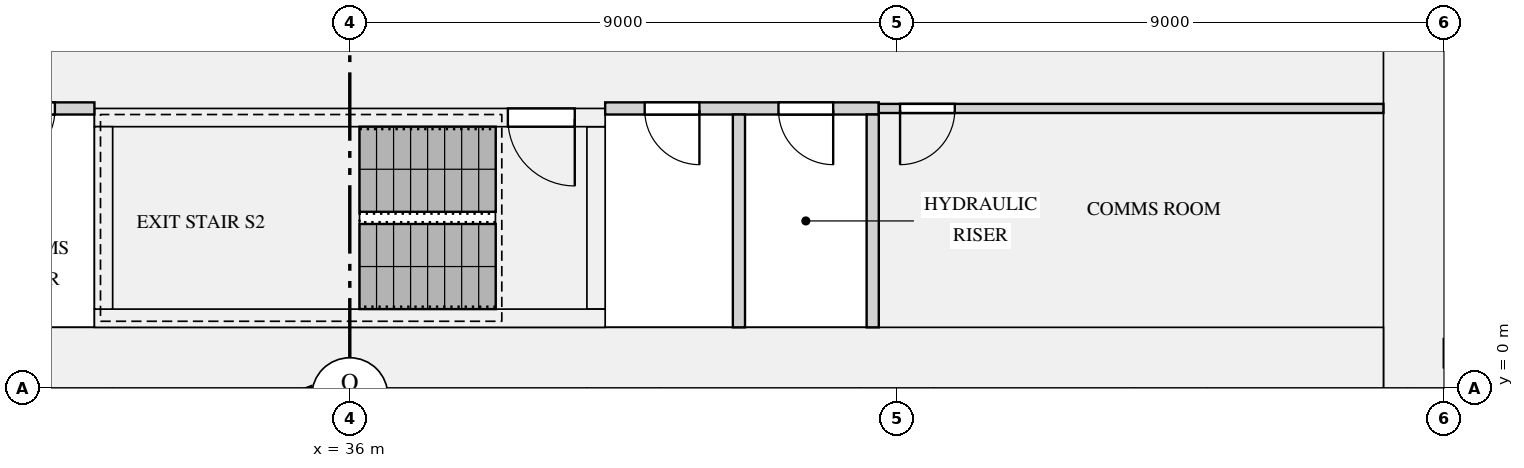
"""IFC4 building model, lengths in metres.
Left out: names, types, materials, properties, quantities, classifications, styles, units other than length and angle.
Written with IfcOpenShell. Run it as: python <this file> out.ifc"""

import sys

from ifc_helpers import new_model, si_unit, direction, frame, frame_2d, origin, place, context, subcontext, project, spatial, rectangle, extrude, element, fill, save


model = new_model("IFC4")
c1 = context("Model", 3, precision=1e-05, world=origin(), true_north=direction((0.0, 1.0)))
c2 = subcontext(c1, "Body", "Model", "MODEL_VIEW")
j1 = project(units=[si_unit("LENGTHUNIT", "METRE"), si_unit("PLANEANGLEUNIT", "RADIAN")], contexts=[c1])
p1 = place(None, origin())
s1 = spatial("IfcSite", under=j1, at=p1, CompositionType="ELEMENT")
p2 = place(p1, origin())
s2 = spatial("IfcBuilding", under=s1, at=p2, CompositionType="ELEMENT")
p3 = place(p2, frame((0.0, 0.0, 28.95)))
s3 = spatial("IfcBuildingStorey", under=s2, at=p3, CompositionType="ELEMENT", Elevation=28.95)
p4 = place(p3, frame((53.5, 0.0, 0.0), z_axis=(0.0, 0.0, 1.0), x_axis=(0.0, 1.0, 0.0)))
e1 = element("IfcWall", 1, at=p4, inside=s3, PredefinedType="SHEAR", context=c2, shape_type="SweptSolid", body=[
    extrude(rectangle(XDim=12.5, YDim=1.0, at=frame_2d((6.25, 0.0))), origin(), (0.0, 0.0, 1.0), 3.15),
])
p5 = place(p3, frame((19.0, 0.5, 0.0), z_axis=(0.0, 0.0, 1.0), x_axis=(1.0, 0.0, 0.0)))
e2 = element("IfcWall", 2, at=p5, inside=s3, PredefinedType="SHEAR", context=c2, shape_type="SweptSolid", body=[
    extrude(rectangle(XDim=34.0, YDim=1.0, at=frame_2d((17.0, 0.0))), origin(), (0.0, 0.0, 1.0), 3.15),
])
p6 = place(p3, frame((31.8, 1.15, 0.0), z_axis=(0.0, 0.0, 1.0), x_axis=(1.0, 0.0, 0.0)))
e3 = element("IfcWall", 3, at=p6, inside=s3, PredefinedType="SHEAR", context=c2, shape_type="SweptSolid", body=[
    extrude(rectangle(XDim=8.4, YDim=0.3, at=frame_2d((4.2, 0.0))), origin(), (0.0, 0.0, 1.0), 3.15),
])
p7 = place(p3, frame((31.8, 4.45, 0.0), z_axis=(0.0, 0.0, 1.0), x_axis=(1.0, 0.0, 0.0)))
e4 = element("IfcWall", 4, at=p7, inside=s3, PredefinedType="SHEAR", context=c2, shape_type="SweptSolid", body=[
    extrude(rectangle(XDim=8.4, YDim=0.3, at=frame_2d((4.2, 0.0))), origin(), (0.0, 0.0, 1.0), 3.15),
])
p8 = place(p7, frame((6.8, 0.0, 0.0)))
e5 = element("IfcOpeningElement", 5, at=p8, cuts=e4, PredefinedType="OPENING", context=c2, shape_type="SweptSolid", body=[
    extrude(rectangle(XDim=1.1, YDim=2.1, at=frame_2d((0.55, 1.05))), frame((0.0, 0.16, 0.0), z_axis=(0.0, -1.0, 0.0), x_axis=(1.0, 0.0, 0.0)), (0.0, 0.0, 1.0), 0.32),
])
for number, where, z_axis, x_axis in (
    (6, (31.95, 1.3, 0.0), (0.0, 0.0, 1.0), (0.0, 1.0, 0.0)),
    (7, (40.05, 1.3, 0.0), (0.0, 0.0, 1.0), (0.0, 1.0, 0.0)),
):
    element("IfcWall", number, at=place(p3, frame(where, z_axis=z_axis, x_axis=x_axis)), inside=s3, PredefinedType="SHEAR", context=c2, shape_type="SweptSolid", body=[
        extrude(rectangle(XDim=3.0, YDim=0.3, at=frame_2d((1.5, 0.0))), origin(), (0.0, 0.0, 1.0), 3.15),
    ])
p9 = place(p3, frame((27.3, 4.6, 0.0), z_axis=(0.0, 0.0, 1.0), x_axis=(1.0, 0.0, 0.0)))
e8 = element("IfcWall", 8, at=p9, inside=s3, PredefinedType="PARTITIONING", context=c2, shape_type="SweptSolid", body=[
    extrude(rectangle(XDim=4.5, YDim=0.2, at=frame_2d((2.25, 0.0))), origin(), (0.0, 0.0, 1.0), 2.83),
])
p10 = place(p9, frame((0.75, 0.0, 0.0)))
e9 = element("IfcOpeningElement", 9, at=p10, cuts=e8, PredefinedType="OPENING", context=c2, shape_type="SweptSolid", body=[
    extrude(rectangle(XDim=0.9, YDim=2.1, at=frame_2d((0.45, 1.05))), frame((0.0, 0.11, 0.0), z_axis=(0.0, -1.0, 0.0), x_axis=(1.0, 0.0, 0.0)), (0.0, 0.0, 1.0), 0.22),
])
p11 = place(p9, frame((2.95, 0.0, 0.0)))
e10 = element("IfcOpeningElement", 10, at=p11, cuts=e8, PredefinedType="OPENING", context=c2, shape_type="SweptSolid", body=[
    extrude(rectangle(XDim=0.9, YDim=2.1, at=frame_2d((0.45, 1.05))), frame((0.0, 0.11, 0.0), z_axis=(0.0, -1.0, 0.0), x_axis=(1.0, 0.0, 0.0)), (0.0, 0.0, 1.0), 0.22),
])
p12 = place(p3, frame((40.2, 4.6, 0.0), z_axis=(0.0, 0.0, 1.0), x_axis=(1.0, 0.0, 0.0)))
e11 = element("IfcWall", 11, at=p12, inside=s3, PredefinedType="PARTITIONING", context=c2, shape_type="SweptSolid", body=[
    extrude(rectangle(XDim=4.5, YDim=0.2, at=frame_2d((2.25, 0.0))), origin(), (0.0, 0.0, 1.0), 2.83),
])
p13 = place(p12, frame((0.65, 0.0, 0.0)))
e12 = element("IfcOpeningElement", 12, at=p13, cuts=e11, PredefinedType="OPENING", context=c2, shape_type="SweptSolid", body=[
    extrude(rectangle(XDim=0.9, YDim=2.1, at=frame_2d((0.45, 1.05))), frame((0.0, 0.11, 0.0), z_axis=(0.0, -1.0, 0.0), x_axis=(1.0, 0.0, 0.0)), (0.0, 0.0, 1.0), 0.22),
])
p14 = place(p12, frame((2.85, 0.0, 0.0)))
e13 = element("IfcOpeningElement", 13, at=p14, cuts=e11, PredefinedType="OPENING", context=c2, shape_type="SweptSolid", body=[
    extrude(rectangle(XDim=0.9, YDim=2.1, at=frame_2d((0.45, 1.05))), frame((0.0, 0.11, 0.0), z_axis=(0.0, -1.0, 0.0), x_axis=(1.0, 0.0, 0.0)), (0.0, 0.0, 1.0), 0.22),
])
p15 = place(p3, frame((44.7, 4.6, 0.0), z_axis=(0.0, 0.0, 1.0), x_axis=(1.0, 0.0, 0.0)))
e14 = element("IfcWall", 14, at=p15, inside=s3, PredefinedType="PARTITIONING", context=c2, shape_type="SweptSolid", body=[
    extrude(rectangle(XDim=8.3, YDim=0.15, at=frame_2d((4.15, 0.0))), origin(), (0.0, 0.0, 1.0), 2.83),
])
p16 = place(p15, frame((0.35, 0.0, 0.0)))
e15 = element("IfcOpeningElement", 15, at=p16, cuts=e14, PredefinedType="OPENING", context=c2, shape_type="SweptSolid", body=[
    extrude(rectangle(XDim=0.9, YDim=2.1, at=frame_2d((0.45, 1.05))), frame((0.0, 0.085, 0.0), z_axis=(0.0, -1.0, 0.0), x_axis=(1.0, 0.0, 0.0)), (0.0, 0.0, 1.0), 0.17),
])
for number, where, z_axis, x_axis in (
    (16, (42.4, 1.0, 0.0), (0.0, 0.0, 1.0), (0.0, 1.0, 0.0)),
    (17, (44.6, 1.0, 0.0), (0.0, 0.0, 1.0), (0.0, 1.0, 0.0)),
):
    element("IfcWall", number, at=place(p3, frame(where, z_axis=z_axis, x_axis=x_axis)), inside=s3, PredefinedType="PARTITIONING", context=c2, shape_type="SweptSolid", body=[
        extrude(rectangle(XDim=3.5, YDim=0.2, at=frame_2d((1.75, 0.0))), origin(), (0.0, 0.0, 1.0), 2.83),
    ])
p17 = place(p8, frame((1.1, 0.0, 0.0), z_axis=(0.0, 0.0, 1.0), x_axis=(-1.0, 0.0, 0.0)))
e18 = element("IfcDoor", 18, at=p17, inside=s3, OperationType="SINGLE_SWING_LEFT", PredefinedType="DOOR", context=c2, shape_type="SweptSolid", body=[
    extrude(rectangle(XDim=1.1, YDim=2.1, at=frame_2d((0.55, 1.05))), frame((0.0, 0.025, 0.0), z_axis=(0.0, -1.0, 0.0), x_axis=(1.0, 0.0, 0.0)), (0.0, 0.0, 1.0), 0.05),
])
fill(e5, e18)
p18 = place(p16, frame((0.9, 0.0, 0.0), z_axis=(0.0, 0.0, 1.0), x_axis=(-1.0, 0.0, 0.0)))
e19 = element("IfcDoor", 19, at=p18, inside=s3, OperationType="SINGLE_SWING_RIGHT", PredefinedType="DOOR", context=c2, shape_type="SweptSolid", body=[
    extrude(rectangle(XDim=0.9, YDim=2.1, at=frame_2d((0.45, 1.05))), frame((0.0, 0.025, 0.0), z_axis=(0.0, -1.0, 0.0), x_axis=(1.0, 0.0, 0.0)), (0.0, 0.0, 1.0), 0.05),
])
fill(e15, e19)
p19 = place(p11, frame((0.9, 0.0, 0.0), z_axis=(0.0, 0.0, 1.0), x_axis=(-1.0, 0.0, 0.0)))
e20 = element("IfcDoor", 20, at=p19, inside=s3, OperationType="SINGLE_SWING_RIGHT", PredefinedType="DOOR", context=c2, shape_type="SweptSolid", body=[
    extrude(rectangle(XDim=0.9, YDim=2.1, at=frame_2d((0.45, 1.05))), frame((0.0, 0.025, 0.0), z_axis=(0.0, -1.0, 0.0), x_axis=(1.0, 0.0, 0.0)), (0.0, 0.0, 1.0), 0.05),
])
fill(e10, e20)
p20 = place(p13, frame((0.9, 0.0, 0.0), z_axis=(0.0, 0.0, 1.0), x_axis=(-1.0, 0.0, 0.0)))
e21 = element("IfcDoor", 21, at=p20, inside=s3, OperationType="SINGLE_SWING_LEFT", PredefinedType="DOOR", context=c2, shape_type="SweptSolid", body=[
    extrude(rectangle(XDim=0.9, YDim=2.1, at=frame_2d((0.45, 1.05))), frame((0.0, 0.025, 0.0), z_axis=(0.0, -1.0, 0.0), x_axis=(1.0, 0.0, 0.0)), (0.0, 0.0, 1.0), 0.05),
])
fill(e12, e21)
p21 = place(p14, frame((0.9, 0.0, 0.0), z_axis=(0.0, 0.0, 1.0), x_axis=(-1.0, 0.0, 0.0)))
e22 = element("IfcDoor", 22, at=p21, inside=s3, OperationType="SINGLE_SWING_LEFT", PredefinedType="DOOR", context=c2, shape_type="SweptSolid", body=[
    extrude(rectangle(XDim=0.9, YDim=2.1, at=frame_2d((0.45, 1.05))), frame((0.0, 0.025, 0.0), z_axis=(0.0, -1.0, 0.0), x_axis=(1.0, 0.0, 0.0)), (0.0, 0.0, 1.0), 0.05),
])
fill(e13, e22)
save(model, sys.argv[1])
